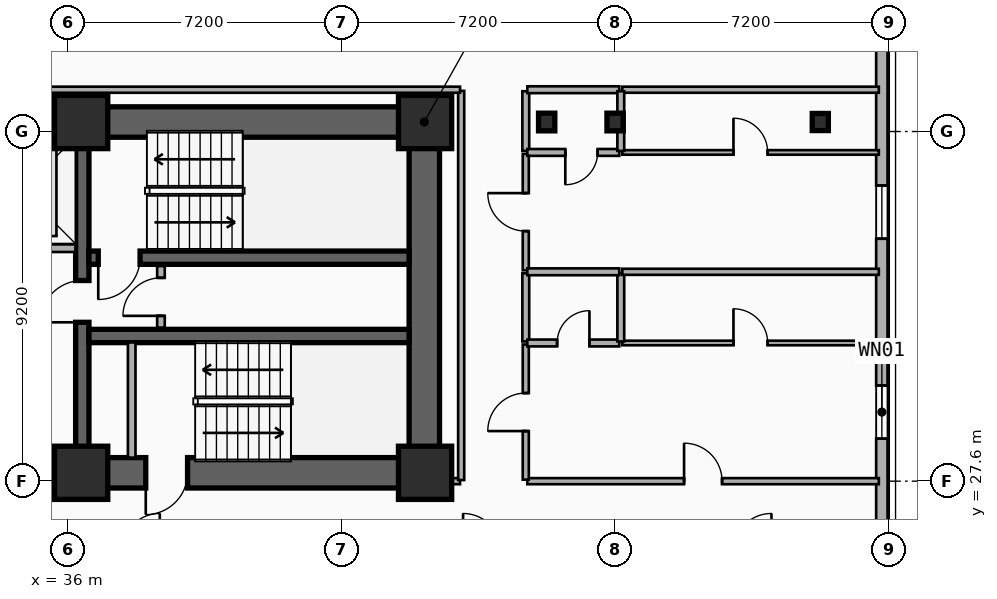
"""IFC4 building model, lengths in metres.
Left out: names, types, materials, properties, quantities, classifications, styles, units other than length and angle.
Written with IfcOpenShell. Run it as: python <this file> out.ifc"""

import sys

from ifc_helpers import new_model, si_unit, direction, frame, frame_2d, origin, origin_2d, place, context, subcontext, project, spatial, rectangle, i_section, extrude, element, fill, save


model = new_model("IFC4")
c1 = context("Model", 3, precision=1e-05, world=origin(), true_north=direction((0.0, 1.0)))
c2 = subcontext(c1, "Body", "Model", "MODEL_VIEW")
j1 = project(units=[si_unit("LENGTHUNIT", "METRE"), si_unit("PLANEANGLEUNIT", "RADIAN")], contexts=[c1])
p1 = place(None, origin())
s1 = spatial("IfcSite", under=j1, at=p1, CompositionType="ELEMENT")
p2 = place(p1, origin())
s2 = spatial("IfcBuilding", under=s1, at=p2, CompositionType="ELEMENT")
p3 = place(p2, frame((0.0, 0.0, 29.0)))
s3 = spatial("IfcBuildingStorey", under=s2, at=p3, CompositionType="ELEMENT", Elevation=29.0)
p4 = place(p3, frame((12.15, 37.05, 0.0), z_axis=(0.0, 0.0, 1.0), x_axis=(1.0, 0.0, 0.0)))
e1 = element("IfcWall", 1, at=p4, inside=s3, PredefinedType="SHEAR", context=c2, shape_type="SweptSolid", body=[
    extrude(rectangle(XDim=33.23, YDim=0.8, at=frame_2d((16.615, 0.0))), origin(), (0.0, 0.0, 1.0), 3.5),
])
p5 = place(p3, frame((45.38, 27.82, 0.0), z_axis=(0.0, 0.0, 1.0), x_axis=(-1.0, 0.0, 0.0)))
e2 = element("IfcWall", 2, at=p5, inside=s3, PredefinedType="SHEAR", context=c2, shape_type="SweptSolid", body=[
    extrude(rectangle(XDim=12.23, YDim=0.8, at=frame_2d((6.115, 0.0))), origin(), (0.0, 0.0, 1.0), 3.5),
])
p6 = place(p5, frame((9.93, 0.0, 0.0)))
e3 = element("IfcOpeningElement", 3, at=p6, cuts=e2, PredefinedType="OPENING", context=c2, shape_type="SweptSolid", body=[
    extrude(rectangle(XDim=1.1, YDim=2.15, at=frame_2d((0.55, 1.075))), frame((0.0, 0.41, 0.0), z_axis=(0.0, -1.0, 0.0), x_axis=(1.0, 0.0, 0.0)), (0.0, 0.0, 1.0), 0.82),
])
p7 = place(p5, frame((6.23, 0.0, 0.0)))
e4 = element("IfcOpeningElement", 4, at=p7, cuts=e2, PredefinedType="OPENING", context=c2, shape_type="SweptSolid", body=[
    extrude(rectangle(XDim=1.1, YDim=2.15, at=frame_2d((0.55, 1.075))), frame((0.0, 0.41, 0.0), z_axis=(0.0, -1.0, 0.0), x_axis=(1.0, 0.0, 0.0)), (0.0, 0.0, 1.0), 0.82),
])
p8 = place(p3, frame((45.38, 28.22, 0.0), z_axis=(0.0, 0.0, 1.0), x_axis=(0.0, 1.0, 0.0)))
e5 = element("IfcWall", 5, at=p8, inside=s3, PredefinedType="SHEAR", context=c2, shape_type="SweptSolid", body=[
    extrude(rectangle(XDim=8.43, YDim=0.8, at=frame_2d((4.215, 0.0))), origin(), (0.0, 0.0, 1.0), 3.5),
])
p9 = place(p3, frame((36.38, 28.22, 0.0), z_axis=(0.0, 0.0, 1.0), x_axis=(0.0, 1.0, 0.0)))
e6 = element("IfcWall", 6, at=p9, inside=s3, PredefinedType="SHEAR", context=c2, shape_type="SweptSolid", body=[
    extrude(rectangle(XDim=8.43, YDim=0.35, at=frame_2d((4.215, 0.0))), origin(), (0.0, 0.0, 1.0), 3.5),
])
p10 = place(p9, frame((3.56, 0.0, 0.0)))
e7 = element("IfcOpeningElement", 7, at=p10, cuts=e6, PredefinedType="OPENING", context=c2, shape_type="SweptSolid", body=[
    extrude(rectangle(XDim=1.1, YDim=2.15, at=frame_2d((0.55, 1.075))), frame((0.0, 0.185, 0.0), z_axis=(0.0, -1.0, 0.0), x_axis=(1.0, 0.0, 0.0)), (0.0, 0.0, 1.0), 0.37),
])
p11 = place(p3, frame((44.98, 33.48, 0.0), z_axis=(0.0, 0.0, 1.0), x_axis=(-1.0, 0.0, 0.0)))
e8 = element("IfcWall", 8, at=p11, inside=s3, PredefinedType="SHEAR", context=c2, shape_type="SweptSolid", body=[
    extrude(rectangle(XDim=8.425, YDim=0.35, at=frame_2d((4.212, 0.0))), origin(), (0.0, 0.0, 1.0), 3.5),
])
p12 = place(p11, frame((7.08, 0.0, 0.0)))
e9 = element("IfcOpeningElement", 9, at=p12, cuts=e8, PredefinedType="OPENING", context=c2, shape_type="SweptSolid", body=[
    extrude(rectangle(XDim=1.1, YDim=2.15, at=frame_2d((0.55, 1.075))), frame((0.0, 0.185, 0.0), z_axis=(0.0, -1.0, 0.0), x_axis=(1.0, 0.0, 0.0)), (0.0, 0.0, 1.0), 0.37),
])
p13 = place(p3, frame((36.555, 31.42, 0.0), z_axis=(0.0, 0.0, 1.0), x_axis=(1.0, 0.0, 0.0)))
e10 = element("IfcWall", 10, at=p13, inside=s3, PredefinedType="SHEAR", context=c2, shape_type="SweptSolid", body=[
    extrude(rectangle(XDim=8.425, YDim=0.35, at=frame_2d((4.212, 0.0))), origin(), (0.0, 0.0, 1.0), 3.5),
])
for number, where, z_axis, x_axis in (
    (11, (36.35, 27.82, 0.0), (0.0, 0.0, 1.0), (1.0, 0.0, 0.0)),
    (12, (36.35, 37.05, 0.0), (0.0, 0.0, 1.0), (1.0, 0.0, 0.0)),
    (13, (45.4, 27.82, 0.0), (0.0, 0.0, 1.0), (1.0, 0.0, 0.0)),
    (14, (45.4, 37.05, 0.0), (0.0, 0.0, 1.0), (1.0, 0.0, 0.0)),
):
    element("IfcColumn", number, at=place(p3, frame(where, z_axis=z_axis, x_axis=x_axis)), inside=s3, PredefinedType="COLUMN", context=c2, shape_type="SweptSolid", body=[
        extrude(rectangle(XDim=1.4, YDim=1.4, at=origin_2d()), origin(), (0.0, 0.0, 1.0), 3.5),
    ])
for number, where, z_axis, x_axis in (
    (15, (48.6, 37.05, 0.0), (0.0, 0.0, 1.0), (1.0, 0.0, 0.0)),
    (16, (50.4, 37.05, 0.0), (0.0, 0.0, 1.0), (1.0, 0.0, 0.0)),
):
    element("IfcColumn", number, at=place(p3, frame(where, z_axis=z_axis, x_axis=x_axis)), inside=s3, PredefinedType="COLUMN", context=c2, shape_type="SweptSolid", body=[
        extrude(i_section(OverallWidth=0.428, OverallDepth=0.465, WebThickness=0.045, FlangeThickness=0.073, FilletRadius=0.015, at=origin_2d()), origin(), (0.0, 0.0, 1.0), 3.5),
    ])
p14 = place(p3, frame((55.8, 37.05, 0.0), z_axis=(0.0, 0.0, 1.0), x_axis=(1.0, 0.0, 0.0)))
e17 = element("IfcColumn", 17, at=p14, inside=s3, PredefinedType="COLUMN", context=c2, shape_type="SweptSolid", body=[
    extrude(i_section(OverallWidth=0.424, OverallDepth=0.45, WebThickness=0.041, FlangeThickness=0.065, FilletRadius=0.015, at=origin_2d()), origin(), (0.0, 0.0, 1.0), 3.5),
])
p15 = place(p3, frame((57.42, 41.0, 0.0), z_axis=(0.0, 0.0, 1.0), x_axis=(0.0, -1.0, 0.0)))
e18 = element("IfcWall", 18, at=p15, inside=s3, PredefinedType="SOLIDWALL", context=c2, shape_type="SweptSolid", body=[
    extrude(rectangle(XDim=15.2, YDim=0.3, at=frame_2d((7.6, 0.0))), origin(), (0.0, 0.0, 1.0), 3.24),
])
p16 = place(p15, frame((10.882, 0.0, 0.48)))
e19 = element("IfcOpeningElement", 19, at=p16, cuts=e18, PredefinedType="OPENING", context=c2, shape_type="SweptSolid", body=[
    extrude(rectangle(XDim=1.4, YDim=1.8, at=frame_2d((0.7, 0.9))), frame((0.0, 0.16, 0.0), z_axis=(0.0, -1.0, 0.0), x_axis=(1.0, 0.0, 0.0)), (0.0, 0.0, 1.0), 0.32),
])
p17 = place(p15, frame((5.621, 0.0, 0.48)))
e20 = element("IfcOpeningElement", 20, at=p17, cuts=e18, PredefinedType="OPENING", context=c2, shape_type="SweptSolid", body=[
    extrude(rectangle(XDim=1.4, YDim=1.8, at=frame_2d((0.7, 0.9))), frame((0.0, 0.16, 0.0), z_axis=(0.0, -1.0, 0.0), x_axis=(1.0, 0.0, 0.0)), (0.0, 0.0, 1.0), 0.32),
])
p18 = place(p3, frame((33.475, 33.73, 0.0), z_axis=(0.0, 0.0, 1.0), x_axis=(1.0, 0.0, 0.0)))
e21 = element("IfcWall", 21, at=p18, inside=s3, PredefinedType="PARTITIONING", context=c2, shape_type="SweptSolid", body=[
    extrude(rectangle(XDim=2.725, YDim=0.2, at=frame_2d((1.362, 0.0))), origin(), (0.0, 0.0, 1.0), 2.212),
])
p19 = place(p18, frame((0.812, 0.0, 0.0)))
e22 = element("IfcOpeningElement", 22, at=p19, cuts=e21, PredefinedType="OPENING", context=c2, shape_type="SweptSolid", body=[
    extrude(rectangle(XDim=1.1, YDim=2.15, at=frame_2d((0.55, 1.075))), frame((0.0, 0.11, 0.0), z_axis=(0.0, -1.0, 0.0), x_axis=(1.0, 0.0, 0.0)), (0.0, 0.0, 1.0), 0.22),
])
p20 = place(p3, frame((37.68, 28.22, 0.0), z_axis=(0.0, 0.0, 1.0), x_axis=(0.0, 1.0, 0.0)))
e23 = element("IfcWall", 23, at=p20, inside=s3, PredefinedType="PARTITIONING", context=c2, shape_type="SweptSolid", body=[
    extrude(rectangle(XDim=3.03, YDim=0.2, at=frame_2d((1.515, 0.0))), origin(), (0.0, 0.0, 1.0), 2.62),
])
p21 = place(p3, frame((38.45, 31.64, 0.0), z_axis=(0.0, 0.0, 1.0), x_axis=(0.0, 1.0, 0.0)))
e24 = element("IfcWall", 24, at=p21, inside=s3, PredefinedType="PARTITIONING", context=c2, shape_type="SweptSolid", body=[
    extrude(rectangle(XDim=1.62, YDim=0.2, at=frame_2d((0.81, 0.0))), origin(), (0.0, 0.0, 1.0), 3.24),
])
p22 = place(p21, frame((0.31, 0.0, 0.0)))
e25 = element("IfcOpeningElement", 25, at=p22, cuts=e24, PredefinedType="OPENING", context=c2, shape_type="SweptSolid", body=[
    extrude(rectangle(XDim=1.0, YDim=2.15, at=frame_2d((0.5, 1.075))), frame((0.0, 0.11, 0.0), z_axis=(0.0, -1.0, 0.0), x_axis=(1.0, 0.0, 0.0)), (0.0, 0.0, 1.0), 0.22),
])
p23 = place(p3, frame((48.09, 27.6, 0.0), z_axis=(0.0, 0.0, 1.0), x_axis=(1.0, 0.0, 0.0)))
e26 = element("IfcWall", 26, at=p23, inside=s3, PredefinedType="PARTITIONING", context=c2, shape_type="SweptSolid", body=[
    extrude(rectangle(XDim=9.25, YDim=0.16, at=frame_2d((4.625, 0.0))), origin(), (0.0, 0.0, 1.0), 2.57),
])
p24 = place(p23, frame((4.125, 0.0, 0.0)))
e27 = element("IfcOpeningElement", 27, at=p24, cuts=e26, PredefinedType="OPENING", context=c2, shape_type="SweptSolid", body=[
    extrude(rectangle(XDim=1.0, YDim=2.15, at=frame_2d((0.5, 1.075))), frame((0.0, 0.09, 0.0), z_axis=(0.0, -1.0, 0.0), x_axis=(1.0, 0.0, 0.0)), (0.0, 0.0, 1.0), 0.18),
])
p25 = place(p3, frame((48.05, 27.64, 0.0), z_axis=(0.0, 0.0, 1.0), x_axis=(0.0, 1.0, 0.0)))
e28 = element("IfcWall", 28, at=p25, inside=s3, PredefinedType="PARTITIONING", context=c2, shape_type="SweptSolid", body=[
    extrude(rectangle(XDim=3.556, YDim=0.16, at=frame_2d((1.778, 0.0))), origin(), (0.0, 0.0, 1.0), 3.24),
])
p26 = place(p25, frame((1.278, 0.0, 0.0)))
e29 = element("IfcOpeningElement", 29, at=p26, cuts=e28, PredefinedType="OPENING", context=c2, shape_type="SweptSolid", body=[
    extrude(rectangle(XDim=1.0, YDim=2.15, at=frame_2d((0.5, 1.075))), frame((0.0, 0.09, 0.0), z_axis=(0.0, -1.0, 0.0), x_axis=(1.0, 0.0, 0.0)), (0.0, 0.0, 1.0), 0.18),
])
p27 = place(p3, frame((48.05, 31.276, 0.0), z_axis=(0.0, 0.0, 1.0), x_axis=(0.0, 1.0, 0.0)))
e30 = element("IfcWall", 30, at=p27, inside=s3, PredefinedType="PLUMBINGWALL", context=c2, shape_type="SweptSolid", body=[
    extrude(rectangle(XDim=1.793, YDim=0.18, at=frame_2d((0.896, 0.0))), origin(), (0.0, 0.0, 1.0), 3.24),
])
p28 = place(p3, frame((48.05, 33.149, 0.0), z_axis=(0.0, 0.0, 1.0), x_axis=(0.0, 1.0, 0.0)))
e31 = element("IfcWall", 31, at=p28, inside=s3, PredefinedType="PARTITIONING", context=c2, shape_type="SweptSolid", body=[
    extrude(rectangle(XDim=3.061, YDim=0.16, at=frame_2d((1.531, 0.0))), origin(), (0.0, 0.0, 1.0), 3.24),
])
p29 = place(p28, frame((1.031, 0.0, 0.0)))
e32 = element("IfcOpeningElement", 32, at=p29, cuts=e31, PredefinedType="OPENING", context=c2, shape_type="SweptSolid", body=[
    extrude(rectangle(XDim=1.0, YDim=2.15, at=frame_2d((0.5, 1.075))), frame((0.0, 0.09, 0.0), z_axis=(0.0, -1.0, 0.0), x_axis=(1.0, 0.0, 0.0)), (0.0, 0.0, 1.0), 0.18),
])
p30 = place(p3, frame((48.05, 36.29, 0.0), z_axis=(0.0, 0.0, 1.0), x_axis=(0.0, 1.0, 0.0)))
e33 = element("IfcWall", 33, at=p30, inside=s3, PredefinedType="PLUMBINGWALL", context=c2, shape_type="SweptSolid", body=[
    extrude(rectangle(XDim=1.57, YDim=0.18, at=frame_2d((0.785, 0.0))), origin(), (0.0, 0.0, 1.0), 2.72),
])
p31 = place(p3, frame((48.09, 37.9, 0.0), z_axis=(0.0, 0.0, 1.0), x_axis=(1.0, 0.0, 0.0)))
e34 = element("IfcWall", 34, at=p31, inside=s3, PredefinedType="PLUMBINGWALL", context=c2, shape_type="SweptSolid", body=[
    extrude(rectangle(XDim=2.42, YDim=0.18, at=frame_2d((1.21, 0.0))), origin(), (0.0, 0.0, 1.0), 3.24),
])
p32 = place(p3, frame((50.59, 37.9, 0.0), z_axis=(0.0, 0.0, 1.0), x_axis=(1.0, 0.0, 0.0)))
e35 = element("IfcWall", 35, at=p32, inside=s3, PredefinedType="PARTITIONING", context=c2, shape_type="SweptSolid", body=[
    extrude(rectangle(XDim=6.75, YDim=0.16, at=frame_2d((3.375, 0.0))), origin(), (0.0, 0.0, 1.0), 3.24),
])
p33 = place(p3, frame((48.09, 31.236, 0.0), z_axis=(0.0, 0.0, 1.0), x_axis=(1.0, 0.0, 0.0)))
e36 = element("IfcWall", 36, at=p33, inside=s3, PredefinedType="PLUMBINGWALL", context=c2, shape_type="SweptSolid", body=[
    extrude(rectangle(XDim=2.42, YDim=0.18, at=frame_2d((1.21, 0.0))), origin(), (0.0, 0.0, 1.0), 2.57),
])
p34 = place(p33, frame((0.785, 0.0, 0.0)))
e37 = element("IfcOpeningElement", 37, at=p34, cuts=e36, PredefinedType="OPENING", context=c2, shape_type="SweptSolid", body=[
    extrude(rectangle(XDim=0.85, YDim=2.1, at=frame_2d((0.425, 1.05))), frame((0.0, 0.1, 0.0), z_axis=(0.0, -1.0, 0.0), x_axis=(1.0, 0.0, 0.0)), (0.0, 0.0, 1.0), 0.2),
])
p35 = place(p3, frame((50.59, 31.236, 0.0), z_axis=(0.0, 0.0, 1.0), x_axis=(1.0, 0.0, 0.0)))
e38 = element("IfcWall", 38, at=p35, inside=s3, PredefinedType="PARTITIONING", context=c2, shape_type="SweptSolid", body=[
    extrude(rectangle(XDim=6.75, YDim=0.12, at=frame_2d((3.375, 0.0))), origin(), (0.0, 0.0, 1.0), 2.57),
])
p36 = place(p35, frame((2.925, 0.0, 0.0)))
e39 = element("IfcOpeningElement", 39, at=p36, cuts=e38, PredefinedType="OPENING", context=c2, shape_type="SweptSolid", body=[
    extrude(rectangle(XDim=0.9, YDim=2.1, at=frame_2d((0.45, 1.05))), frame((0.0, 0.07, 0.0), z_axis=(0.0, -1.0, 0.0), x_axis=(1.0, 0.0, 0.0)), (0.0, 0.0, 1.0), 0.14),
])
p37 = place(p3, frame((50.55, 31.276, 0.0), z_axis=(0.0, 0.0, 1.0), x_axis=(0.0, 1.0, 0.0)))
e40 = element("IfcWall", 40, at=p37, inside=s3, PredefinedType="PLUMBINGWALL", context=c2, shape_type="SweptSolid", body=[
    extrude(rectangle(XDim=1.793, YDim=0.18, at=frame_2d((0.896, 0.0))), origin(), (0.0, 0.0, 1.0), 2.57),
])
p38 = place(p3, frame((48.09, 33.109, 0.0), z_axis=(0.0, 0.0, 1.0), x_axis=(1.0, 0.0, 0.0)))
e41 = element("IfcWall", 41, at=p38, inside=s3, PredefinedType="PLUMBINGWALL", context=c2, shape_type="SweptSolid", body=[
    extrude(rectangle(XDim=2.42, YDim=0.18, at=frame_2d((1.21, 0.0))), origin(), (0.0, 0.0, 1.0), 2.57),
])
p39 = place(p3, frame((50.59, 33.109, 0.0), z_axis=(0.0, 0.0, 1.0), x_axis=(1.0, 0.0, 0.0)))
e42 = element("IfcWall", 42, at=p39, inside=s3, PredefinedType="PARTITIONING", context=c2, shape_type="SweptSolid", body=[
    extrude(rectangle(XDim=6.75, YDim=0.16, at=frame_2d((3.375, 0.0))), origin(), (0.0, 0.0, 1.0), 2.57),
])
p40 = place(p3, frame((50.51, 36.25, 0.0), z_axis=(0.0, 0.0, 1.0), x_axis=(-1.0, 0.0, 0.0)))
e43 = element("IfcWall", 43, at=p40, inside=s3, PredefinedType="PLUMBINGWALL", context=c2, shape_type="SweptSolid", body=[
    extrude(rectangle(XDim=2.42, YDim=0.18, at=frame_2d((1.21, 0.0))), origin(), (0.0, 0.0, 1.0), 2.57),
])
p41 = place(p40, frame((0.57, 0.0, 0.0)))
e44 = element("IfcOpeningElement", 44, at=p41, cuts=e43, PredefinedType="OPENING", context=c2, shape_type="SweptSolid", body=[
    extrude(rectangle(XDim=0.85, YDim=2.1, at=frame_2d((0.425, 1.05))), frame((0.0, 0.1, 0.0), z_axis=(0.0, -1.0, 0.0), x_axis=(1.0, 0.0, 0.0)), (0.0, 0.0, 1.0), 0.2),
])
p42 = place(p3, frame((50.59, 36.25, 0.0), z_axis=(0.0, 0.0, 1.0), x_axis=(1.0, 0.0, 0.0)))
e45 = element("IfcWall", 45, at=p42, inside=s3, PredefinedType="PARTITIONING", context=c2, shape_type="SweptSolid", body=[
    extrude(rectangle(XDim=6.75, YDim=0.12, at=frame_2d((3.375, 0.0))), origin(), (0.0, 0.0, 1.0), 2.57),
])
p43 = place(p42, frame((2.925, 0.0, 0.0)))
e46 = element("IfcOpeningElement", 46, at=p43, cuts=e45, PredefinedType="OPENING", context=c2, shape_type="SweptSolid", body=[
    extrude(rectangle(XDim=0.9, YDim=2.1, at=frame_2d((0.45, 1.05))), frame((0.0, 0.07, 0.0), z_axis=(0.0, -1.0, 0.0), x_axis=(1.0, 0.0, 0.0)), (0.0, 0.0, 1.0), 0.14),
])
p44 = place(p3, frame((50.55, 36.29, 0.0), z_axis=(0.0, 0.0, 1.0), x_axis=(0.0, 1.0, 0.0)))
e47 = element("IfcWall", 47, at=p44, inside=s3, PredefinedType="PLUMBINGWALL", context=c2, shape_type="SweptSolid", body=[
    extrude(rectangle(XDim=1.57, YDim=0.18, at=frame_2d((0.785, 0.0))), origin(), (0.0, 0.0, 1.0), 2.57),
])
p45 = place(p3, frame((45.41, 27.6, 0.0), z_axis=(0.0, 0.0, 1.0), x_axis=(1.0, 0.0, 0.0)))
e48 = element("IfcWall", 48, at=p45, inside=s3, PredefinedType="PARTITIONING", context=c2, shape_type="SweptSolid", body=[
    extrude(rectangle(XDim=0.91, YDim=0.16, at=frame_2d((0.455, 0.0))), origin(), (0.0, 0.0, 1.0), 2.28),
])
p46 = place(p3, frame((46.35, 27.63, 0.0), z_axis=(0.0, 0.0, 1.0), x_axis=(0.0, 1.0, 0.0)))
e49 = element("IfcWall", 49, at=p46, inside=s3, PredefinedType="PARTITIONING", context=c2, shape_type="SweptSolid", body=[
    extrude(rectangle(XDim=10.24, YDim=0.16, at=frame_2d((5.12, 0.0))), origin(), (0.0, 0.0, 1.0), 2.72),
])
p47 = place(p3, frame((11.28, 37.9, 0.0), z_axis=(0.0, 0.0, 1.0), x_axis=(1.0, 0.0, 0.0)))
e50 = element("IfcWall", 50, at=p47, inside=s3, PredefinedType="PARTITIONING", context=c2, shape_type="SweptSolid", body=[
    extrude(rectangle(XDim=35.04, YDim=0.16, at=frame_2d((17.52, 0.0))), origin(), (0.0, 0.0, 1.0), 3.24),
])
p48 = place(p16, origin())
e51 = element("IfcWindow", 51, at=p48, inside=s3, PartitioningType="SINGLE_PANEL", PredefinedType="WINDOW", context=c2, shape_type="SweptSolid", body=[
    extrude(rectangle(XDim=1.4, YDim=1.8, at=frame_2d((0.7, 0.9))), frame((0.0, 0.03, 0.0), z_axis=(0.0, -1.0, 0.0), x_axis=(1.0, 0.0, 0.0)), (0.0, 0.0, 1.0), 0.06),
])
fill(e19, e51)
p49 = place(p17, origin())
e52 = element("IfcWindow", 52, at=p49, inside=s3, PartitioningType="SINGLE_PANEL", PredefinedType="WINDOW", context=c2, shape_type="SweptSolid", body=[
    extrude(rectangle(XDim=1.4, YDim=1.8, at=frame_2d((0.7, 0.9))), frame((0.0, 0.03, 0.0), z_axis=(0.0, -1.0, 0.0), x_axis=(1.0, 0.0, 0.0)), (0.0, 0.0, 1.0), 0.06),
])
fill(e20, e52)
p50 = place(p12, origin())
e53 = element("IfcDoor", 53, at=p50, inside=s3, OperationType="SINGLE_SWING_RIGHT", PredefinedType="DOOR", context=c2, shape_type="SweptSolid", body=[
    extrude(rectangle(XDim=1.1, YDim=2.15, at=frame_2d((0.55, 1.075))), frame((0.0, 0.025, 0.0), z_axis=(0.0, -1.0, 0.0), x_axis=(1.0, 0.0, 0.0)), (0.0, 0.0, 1.0), 0.05),
])
fill(e9, e53)
p51 = place(p10, origin())
e54 = element("IfcDoor", 54, at=p51, inside=s3, OperationType="SINGLE_SWING_LEFT", PredefinedType="DOOR", context=c2, shape_type="SweptSolid", body=[
    extrude(rectangle(XDim=1.1, YDim=2.15, at=frame_2d((0.55, 1.075))), frame((0.0, 0.025, 0.0), z_axis=(0.0, -1.0, 0.0), x_axis=(1.0, 0.0, 0.0)), (0.0, 0.0, 1.0), 0.05),
])
fill(e7, e54)
p52 = place(p7, origin())
e55 = element("IfcDoor", 55, at=p52, inside=s3, OperationType="SINGLE_SWING_RIGHT", PredefinedType="DOOR", context=c2, shape_type="SweptSolid", body=[
    extrude(rectangle(XDim=1.1, YDim=2.15, at=frame_2d((0.55, 1.075))), frame((0.0, 0.025, 0.0), z_axis=(0.0, -1.0, 0.0), x_axis=(1.0, 0.0, 0.0)), (0.0, 0.0, 1.0), 0.05),
])
fill(e4, e55)
p53 = place(p22, origin())
e56 = element("IfcDoor", 56, at=p53, inside=s3, OperationType="SINGLE_SWING_LEFT", PredefinedType="DOOR", context=c2, shape_type="SweptSolid", body=[
    extrude(rectangle(XDim=1.0, YDim=2.15, at=frame_2d((0.5, 1.075))), frame((0.0, 0.025, 0.0), z_axis=(0.0, -1.0, 0.0), x_axis=(1.0, 0.0, 0.0)), (0.0, 0.0, 1.0), 0.05),
])
fill(e25, e56)
p54 = place(p24, origin())
e57 = element("IfcDoor", 57, at=p54, inside=s3, OperationType="SINGLE_SWING_LEFT", PredefinedType="DOOR", context=c2, shape_type="SweptSolid", body=[
    extrude(rectangle(XDim=1.0, YDim=2.15, at=frame_2d((0.5, 1.075))), frame((0.0, 0.025, 0.0), z_axis=(0.0, -1.0, 0.0), x_axis=(1.0, 0.0, 0.0)), (0.0, 0.0, 1.0), 0.05),
])
fill(e27, e57)
p55 = place(p26, origin())
e58 = element("IfcDoor", 58, at=p55, inside=s3, OperationType="SINGLE_SWING_LEFT", PredefinedType="DOOR", context=c2, shape_type="SweptSolid", body=[
    extrude(rectangle(XDim=1.0, YDim=2.15, at=frame_2d((0.5, 1.075))), frame((0.0, 0.025, 0.0), z_axis=(0.0, -1.0, 0.0), x_axis=(1.0, 0.0, 0.0)), (0.0, 0.0, 1.0), 0.05),
])
fill(e29, e58)
p56 = place(p29, origin())
e59 = element("IfcDoor", 59, at=p56, inside=s3, OperationType="SINGLE_SWING_RIGHT", PredefinedType="DOOR", context=c2, shape_type="SweptSolid", body=[
    extrude(rectangle(XDim=1.0, YDim=2.15, at=frame_2d((0.5, 1.075))), frame((0.0, 0.025, 0.0), z_axis=(0.0, -1.0, 0.0), x_axis=(1.0, 0.0, 0.0)), (0.0, 0.0, 1.0), 0.05),
])
fill(e32, e59)
p57 = place(p34, origin())
e60 = element("IfcDoor", 60, at=p57, inside=s3, OperationType="SINGLE_SWING_RIGHT", PredefinedType="DOOR", context=c2, shape_type="SweptSolid", body=[
    extrude(rectangle(XDim=0.85, YDim=2.1, at=frame_2d((0.425, 1.05))), frame((0.0, 0.025, 0.0), z_axis=(0.0, -1.0, 0.0), x_axis=(1.0, 0.0, 0.0)), (0.0, 0.0, 1.0), 0.05),
])
fill(e37, e60)
p58 = place(p36, origin())
e61 = element("IfcDoor", 61, at=p58, inside=s3, OperationType="SINGLE_SWING_LEFT", PredefinedType="DOOR", context=c2, shape_type="SweptSolid", body=[
    extrude(rectangle(XDim=0.9, YDim=2.1, at=frame_2d((0.45, 1.05))), frame((0.0, 0.025, 0.0), z_axis=(0.0, -1.0, 0.0), x_axis=(1.0, 0.0, 0.0)), (0.0, 0.0, 1.0), 0.05),
])
fill(e39, e61)
p59 = place(p41, origin())
e62 = element("IfcDoor", 62, at=p59, inside=s3, OperationType="SINGLE_SWING_RIGHT", PredefinedType="DOOR", context=c2, shape_type="SweptSolid", body=[
    extrude(rectangle(XDim=0.85, YDim=2.1, at=frame_2d((0.425, 1.05))), frame((0.0, 0.025, 0.0), z_axis=(0.0, -1.0, 0.0), x_axis=(1.0, 0.0, 0.0)), (0.0, 0.0, 1.0), 0.05),
])
fill(e44, e62)
p60 = place(p43, origin())
e63 = element("IfcDoor", 63, at=p60, inside=s3, OperationType="SINGLE_SWING_LEFT", PredefinedType="DOOR", context=c2, shape_type="SweptSolid", body=[
    extrude(rectangle(XDim=0.9, YDim=2.1, at=frame_2d((0.45, 1.05))), frame((0.0, 0.025, 0.0), z_axis=(0.0, -1.0, 0.0), x_axis=(1.0, 0.0, 0.0)), (0.0, 0.0, 1.0), 0.05),
])
fill(e46, e63)
save(model, sys.argv[1])
